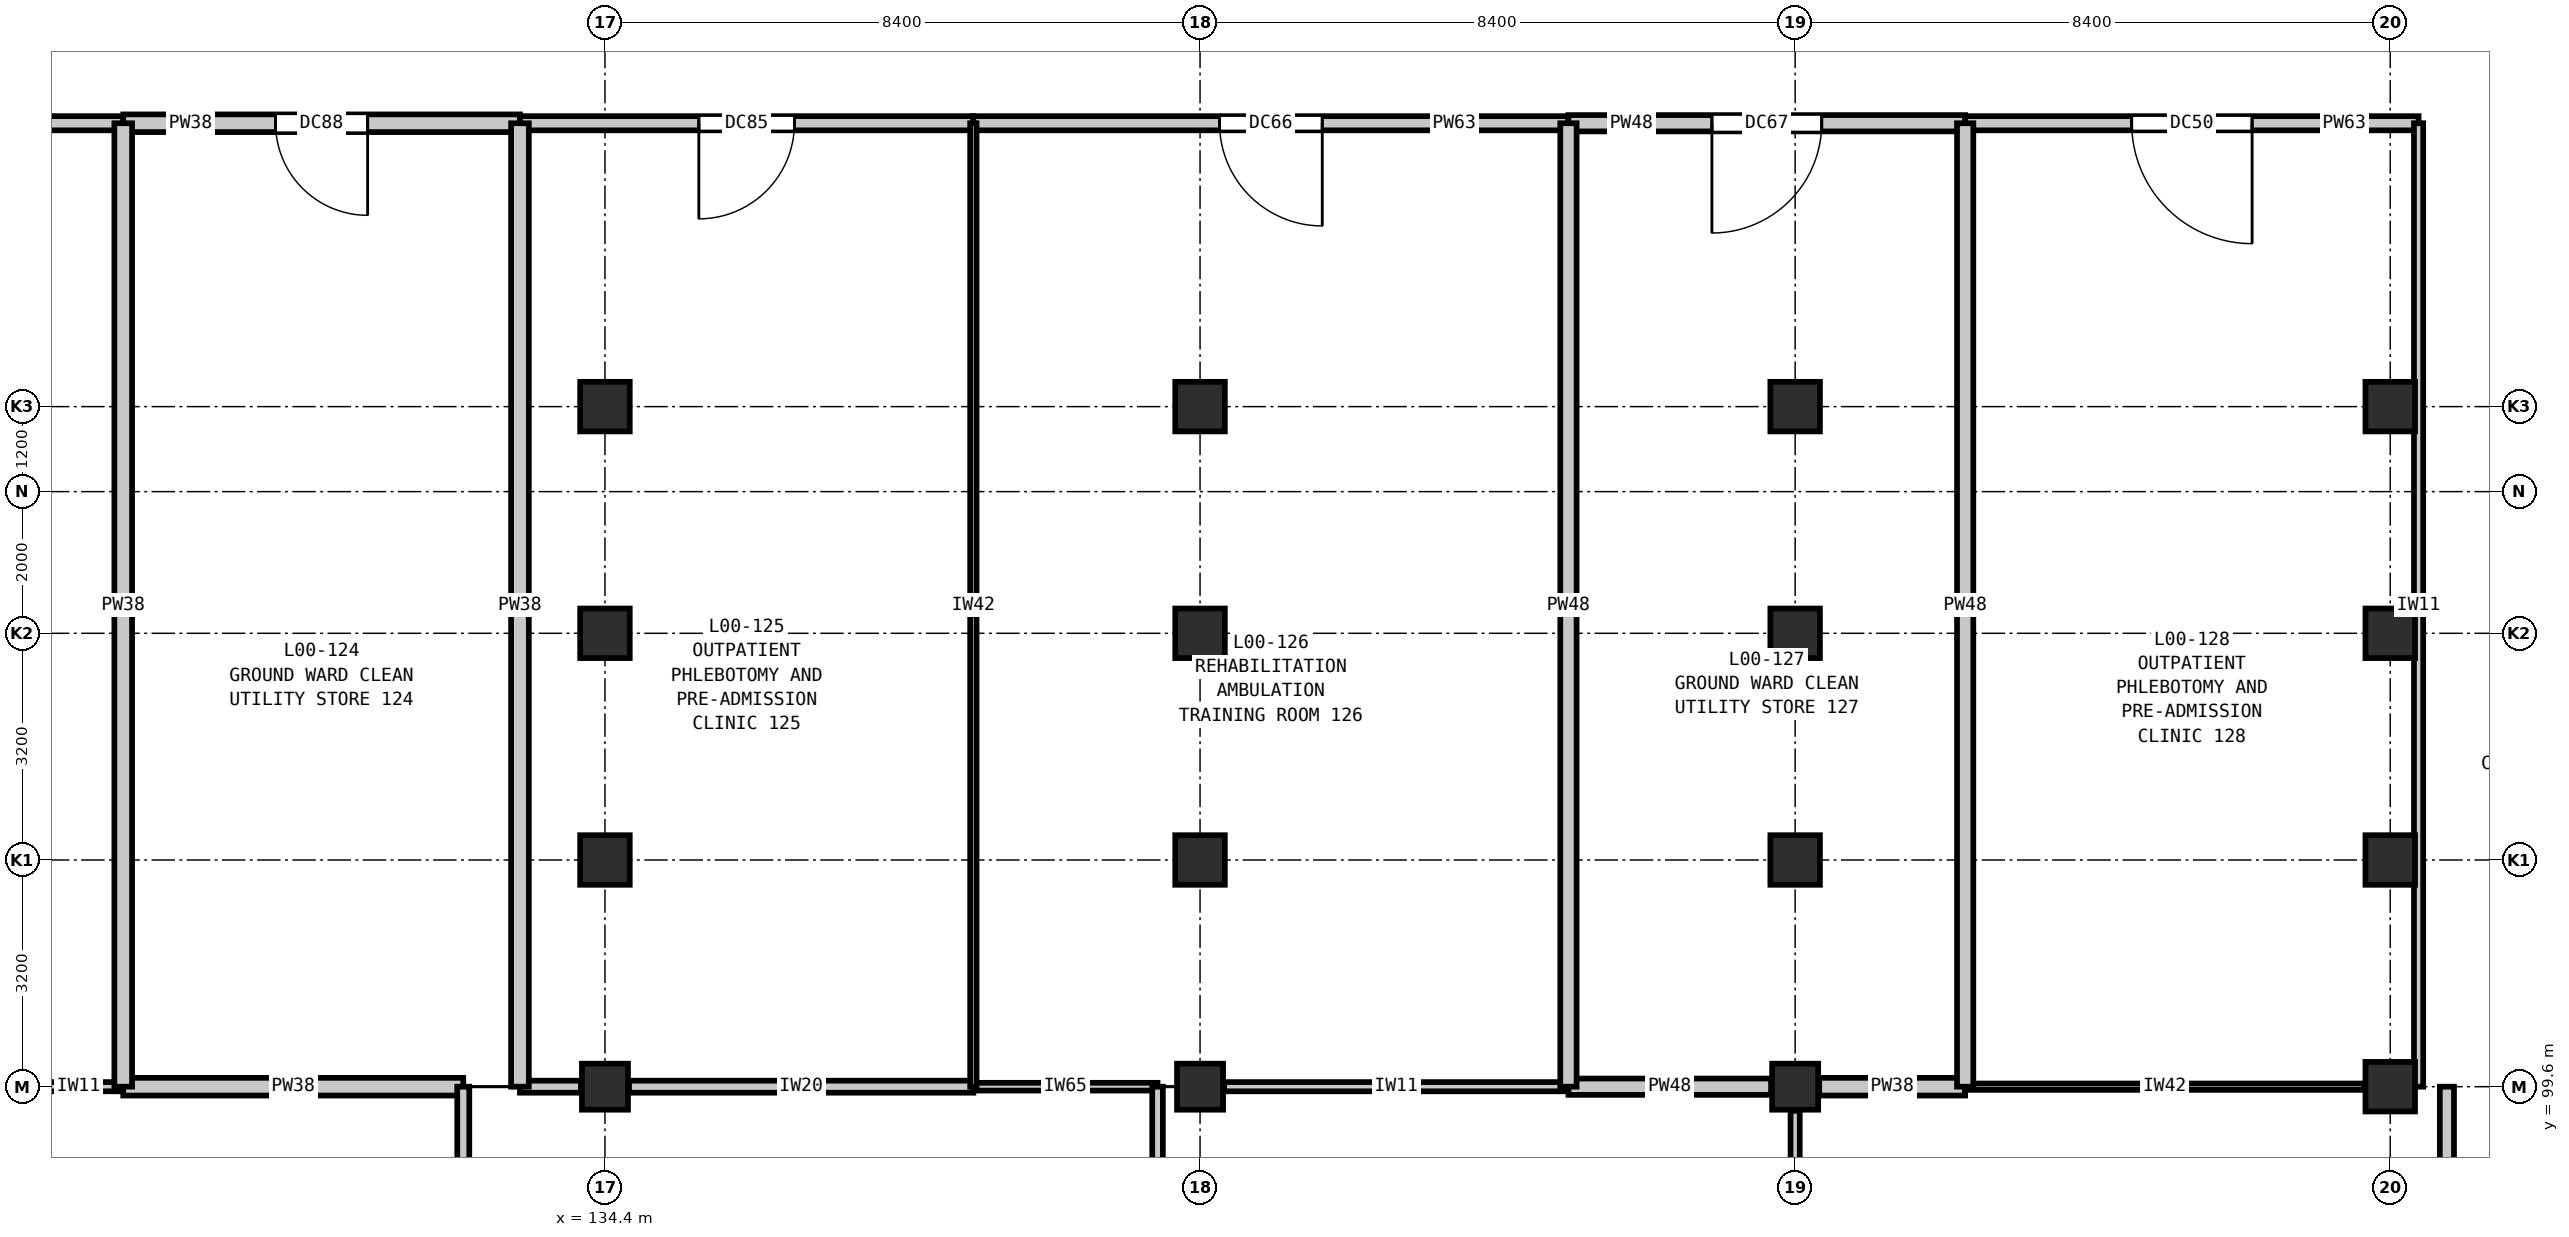
"""IFC4 building model, lengths in metres.
Left out: names, types, materials, properties, quantities, classifications, styles, units other than length and angle.
Written with IfcOpenShell. Run it as: python <this file> out.ifc"""

import sys

from ifc_helpers import new_model, si_unit, direction, frame, frame_2d, origin, origin_2d, place, context, subcontext, project, spatial, rectangle, extrude, element, fill, save


model = new_model("IFC4")
c1 = context("Model", 3, precision=1e-05, world=origin(), true_north=direction((0.0, 1.0)))
c2 = subcontext(c1, "Body", "Model", "MODEL_VIEW")
j1 = project(units=[si_unit("LENGTHUNIT", "METRE"), si_unit("PLANEANGLEUNIT", "RADIAN")], contexts=[c1])
p1 = place(None, origin())
s1 = spatial("IfcSite", under=j1, at=p1, CompositionType="ELEMENT")
p2 = place(p1, origin())
s2 = spatial("IfcBuilding", under=s1, at=p2, CompositionType="ELEMENT")
p3 = place(p2, origin())
s3 = spatial("IfcBuildingStorey", under=s2, at=p3, CompositionType="ELEMENT", Elevation=0.0)
p4 = place(p3, frame((134.4, 99.6, 0.0), z_axis=(0.0, 0.0, 1.0), x_axis=(1.0, 0.0, 0.0)))
e1 = element("IfcColumn", 1, at=p4, inside=s3, PredefinedType="COLUMN", context=c2, shape_type="SweptSolid", body=[
    extrude(rectangle(XDim=0.65, YDim=0.65, at=origin_2d()), origin(), (0.0, 0.0, 1.0), 5.4),
])
for number, where, z_axis, x_axis in (
    (2, (134.4, 102.8, 0.0), (0.0, 0.0, 1.0), (1.0, 0.0, 0.0)),
    (3, (134.4, 106.0, 0.0), (0.0, 0.0, 1.0), (1.0, 0.0, 0.0)),
    (4, (134.4, 109.2, 0.0), (0.0, 0.0, 1.0), (1.0, 0.0, 0.0)),
):
    element("IfcColumn", number, at=place(p3, frame(where, z_axis=z_axis, x_axis=x_axis)), inside=s3, PredefinedType="COLUMN", context=c2, shape_type="SweptSolid", body=[
        extrude(rectangle(XDim=0.7, YDim=0.7, at=origin_2d()), origin(), (0.0, 0.0, 1.0), 5.4),
    ])
p5 = place(p3, frame((142.8, 99.6, 0.0), z_axis=(0.0, 0.0, 1.0), x_axis=(1.0, 0.0, 0.0)))
e5 = element("IfcColumn", 5, at=p5, inside=s3, PredefinedType="COLUMN", context=c2, shape_type="SweptSolid", body=[
    extrude(rectangle(XDim=0.65, YDim=0.65, at=origin_2d()), origin(), (0.0, 0.0, 1.0), 5.4),
])
for number, where, z_axis, x_axis in (
    (6, (142.8, 102.8, 0.0), (0.0, 0.0, 1.0), (1.0, 0.0, 0.0)),
    (7, (142.8, 106.0, 0.0), (0.0, 0.0, 1.0), (1.0, 0.0, 0.0)),
    (8, (142.8, 109.2, 0.0), (0.0, 0.0, 1.0), (1.0, 0.0, 0.0)),
):
    element("IfcColumn", number, at=place(p3, frame(where, z_axis=z_axis, x_axis=x_axis)), inside=s3, PredefinedType="COLUMN", context=c2, shape_type="SweptSolid", body=[
        extrude(rectangle(XDim=0.7, YDim=0.7, at=origin_2d()), origin(), (0.0, 0.0, 1.0), 5.4),
    ])
p6 = place(p3, frame((151.2, 99.6, 0.0), z_axis=(0.0, 0.0, 1.0), x_axis=(1.0, 0.0, 0.0)))
e9 = element("IfcColumn", 9, at=p6, inside=s3, PredefinedType="COLUMN", context=c2, shape_type="SweptSolid", body=[
    extrude(rectangle(XDim=0.65, YDim=0.65, at=origin_2d()), origin(), (0.0, 0.0, 1.0), 5.4),
])
for number, where, z_axis, x_axis in (
    (10, (151.2, 102.8, 0.0), (0.0, 0.0, 1.0), (1.0, 0.0, 0.0)),
    (11, (151.2, 106.0, 0.0), (0.0, 0.0, 1.0), (1.0, 0.0, 0.0)),
    (12, (151.2, 109.2, 0.0), (0.0, 0.0, 1.0), (1.0, 0.0, 0.0)),
    (13, (159.6, 99.6, 0.0), (0.0, 0.0, 1.0), (1.0, 0.0, 0.0)),
    (14, (159.6, 102.8, 0.0), (0.0, 0.0, 1.0), (1.0, 0.0, 0.0)),
    (15, (159.6, 106.0, 0.0), (0.0, 0.0, 1.0), (1.0, 0.0, 0.0)),
    (16, (159.6, 109.2, 0.0), (0.0, 0.0, 1.0), (1.0, 0.0, 0.0)),
):
    element("IfcColumn", number, at=place(p3, frame(where, z_axis=z_axis, x_axis=x_axis)), inside=s3, PredefinedType="COLUMN", context=c2, shape_type="SweptSolid", body=[
        extrude(rectangle(XDim=0.7, YDim=0.7, at=origin_2d()), origin(), (0.0, 0.0, 1.0), 5.4),
    ])
p7 = place(p3, frame((126.34, 99.6, 0.0), z_axis=(0.0, 0.0, 1.0), x_axis=(1.0, 0.0, 0.0)))
e17 = element("IfcWall", 17, at=p7, inside=s3, PredefinedType="PARTITIONING", context=c2, shape_type="SweptSolid", body=[
    extrude(rectangle(XDim=1.26, YDim=0.13, at=frame_2d((0.63, 0.0))), origin(), (0.0, 0.0, 1.0), 4.635),
])
p8 = place(p3, frame((127.6, 99.6, 0.0), z_axis=(0.0, 0.0, 1.0), x_axis=(1.0, 0.0, 0.0)))
e18 = element("IfcWall", 18, at=p8, inside=s3, PredefinedType="PARTITIONING", context=c2, shape_type="SweptSolid", body=[
    extrude(rectangle(XDim=4.8, YDim=0.25, at=frame_2d((2.4, 0.0))), origin(), (0.0, 0.0, 1.0), 4.635),
])
p9 = place(p3, frame((134.74, 99.6, 0.0), z_axis=(0.0, 0.0, 1.0), x_axis=(1.0, 0.0, 0.0)))
e19 = element("IfcWall", 19, at=p9, inside=s3, PredefinedType="PARTITIONING", context=c2, shape_type="SweptSolid", body=[
    extrude(rectangle(XDim=4.86, YDim=0.17, at=frame_2d((2.43, 0.0))), origin(), (0.0, 0.0, 1.0), 4.635),
])
p10 = place(p3, frame((133.2, 99.6, 0.0), z_axis=(0.0, 0.0, 1.0), x_axis=(1.0, 0.0, 0.0)))
e20 = element("IfcWall", 20, at=p10, inside=s3, PredefinedType="PARTITIONING", context=c2, shape_type="SweptSolid", body=[
    extrude(rectangle(XDim=0.86, YDim=0.17, at=frame_2d((0.43, 0.0))), origin(), (0.0, 0.0, 1.0), 4.635),
])
p11 = place(p3, frame((139.6, 99.6, 0.0), z_axis=(0.0, 0.0, 1.0), x_axis=(1.0, 0.0, 0.0)))
e21 = element("IfcWall", 21, at=p11, inside=s3, PredefinedType="PARTITIONING", context=c2, shape_type="SweptSolid", body=[
    extrude(rectangle(XDim=2.6, YDim=0.11, at=frame_2d((1.3, 0.0))), origin(), (0.0, 0.0, 1.0), 4.635),
])
p12 = place(p3, frame((143.14, 99.6, 0.0), z_axis=(0.0, 0.0, 1.0), x_axis=(1.0, 0.0, 0.0)))
e22 = element("IfcWall", 22, at=p12, inside=s3, PredefinedType="PARTITIONING", context=c2, shape_type="SweptSolid", body=[
    extrude(rectangle(XDim=4.86, YDim=0.13, at=frame_2d((2.43, 0.0))), origin(), (0.0, 0.0, 1.0), 4.635),
])
p13 = place(p3, frame((148.0, 99.6, 0.0), z_axis=(0.0, 0.0, 1.0), x_axis=(1.0, 0.0, 0.0)))
e23 = element("IfcWall", 23, at=p13, inside=s3, PredefinedType="PARTITIONING", context=c2, shape_type="SweptSolid", body=[
    extrude(rectangle(XDim=2.86, YDim=0.23, at=frame_2d((1.43, 0.0))), origin(), (0.0, 0.0, 1.0), 4.635),
])
p14 = place(p3, frame((151.54, 99.6, 0.0), z_axis=(0.0, 0.0, 1.0), x_axis=(1.0, 0.0, 0.0)))
e24 = element("IfcWall", 24, at=p14, inside=s3, PredefinedType="PARTITIONING", context=c2, shape_type="SweptSolid", body=[
    extrude(rectangle(XDim=2.06, YDim=0.25, at=frame_2d((1.03, 0.0))), origin(), (0.0, 0.0, 1.0), 4.635),
])
p15 = place(p3, frame((153.6, 99.6, 0.0), z_axis=(0.0, 0.0, 1.0), x_axis=(1.0, 0.0, 0.0)))
e25 = element("IfcWall", 25, at=p15, inside=s3, PredefinedType="PARTITIONING", context=c2, shape_type="SweptSolid", body=[
    extrude(rectangle(XDim=5.635, YDim=0.09, at=frame_2d((2.817, 0.0))), origin(), (0.0, 0.0, 1.0), 4.635),
])
p16 = place(p3, frame((119.2, 113.2, 0.0), z_axis=(0.0, 0.0, 1.0), x_axis=(1.0, 0.0, 0.0)))
e26 = element("IfcWall", 26, at=p16, inside=s3, PredefinedType="PARTITIONING", context=c2, shape_type="SweptSolid", body=[
    extrude(rectangle(XDim=8.4, YDim=0.2, at=frame_2d((4.2, 0.0))), origin(), (0.0, 0.0, 1.0), 5.04),
])
p17 = place(p16, frame((3.575, 0.0, 0.0)))
e27 = element("IfcOpeningElement", 27, at=p17, cuts=e26, PredefinedType="OPENING", context=c2, shape_type="SweptSolid", body=[
    extrude(rectangle(XDim=1.25, YDim=2.15, at=frame_2d((0.625, 1.075))), frame((0.0, 0.11, 0.0), z_axis=(0.0, -1.0, 0.0), x_axis=(1.0, 0.0, 0.0)), (0.0, 0.0, 1.0), 0.22),
])
p18 = place(p3, frame((127.6, 113.2, 0.0), z_axis=(0.0, 0.0, 1.0), x_axis=(1.0, 0.0, 0.0)))
e28 = element("IfcWall", 28, at=p18, inside=s3, PredefinedType="PARTITIONING", context=c2, shape_type="SweptSolid", body=[
    extrude(rectangle(XDim=5.6, YDim=0.25, at=frame_2d((2.8, 0.0))), origin(), (0.0, 0.0, 1.0), 5.04),
])
p19 = place(p18, frame((2.15, 0.0, 0.0)))
e29 = element("IfcOpeningElement", 29, at=p19, cuts=e28, PredefinedType="OPENING", context=c2, shape_type="SweptSolid", body=[
    extrude(rectangle(XDim=1.3, YDim=2.2, at=frame_2d((0.65, 1.1))), frame((0.0, 0.135, 0.0), z_axis=(0.0, -1.0, 0.0), x_axis=(1.0, 0.0, 0.0)), (0.0, 0.0, 1.0), 0.27),
])
p20 = place(p3, frame((133.2, 113.2, 0.0), z_axis=(0.0, 0.0, 1.0), x_axis=(1.0, 0.0, 0.0)))
e30 = element("IfcWall", 30, at=p20, inside=s3, PredefinedType="PARTITIONING", context=c2, shape_type="SweptSolid", body=[
    extrude(rectangle(XDim=6.4, YDim=0.2, at=frame_2d((3.2, 0.0))), origin(), (0.0, 0.0, 1.0), 5.04),
])
p21 = place(p20, frame((2.525, 0.0, 0.0)))
e31 = element("IfcOpeningElement", 31, at=p21, cuts=e30, PredefinedType="OPENING", context=c2, shape_type="SweptSolid", body=[
    extrude(rectangle(XDim=1.35, YDim=2.2, at=frame_2d((0.675, 1.1))), frame((0.0, 0.11, 0.0), z_axis=(0.0, -1.0, 0.0), x_axis=(1.0, 0.0, 0.0)), (0.0, 0.0, 1.0), 0.22),
])
p22 = place(p3, frame((139.6, 113.2, 0.0), z_axis=(0.0, 0.0, 1.0), x_axis=(1.0, 0.0, 0.0)))
e32 = element("IfcWall", 32, at=p22, inside=s3, PredefinedType="PARTITIONING", context=c2, shape_type="SweptSolid", body=[
    extrude(rectangle(XDim=8.4, YDim=0.2, at=frame_2d((4.2, 0.0))), origin(), (0.0, 0.0, 1.0), 5.04),
])
p23 = place(p22, frame((3.475, 0.0, 0.0)))
e33 = element("IfcOpeningElement", 33, at=p23, cuts=e32, PredefinedType="OPENING", context=c2, shape_type="SweptSolid", body=[
    extrude(rectangle(XDim=1.45, YDim=2.25, at=frame_2d((0.725, 1.125))), frame((0.0, 0.11, 0.0), z_axis=(0.0, -1.0, 0.0), x_axis=(1.0, 0.0, 0.0)), (0.0, 0.0, 1.0), 0.22),
])
p24 = place(p3, frame((148.0, 113.2, 0.0), z_axis=(0.0, 0.0, 1.0), x_axis=(1.0, 0.0, 0.0)))
e34 = element("IfcWall", 34, at=p24, inside=s3, PredefinedType="PARTITIONING", context=c2, shape_type="SweptSolid", body=[
    extrude(rectangle(XDim=5.6, YDim=0.23, at=frame_2d((2.8, 0.0))), origin(), (0.0, 0.0, 1.0), 5.04),
])
p25 = place(p24, frame((2.025, 0.0, 0.0)))
e35 = element("IfcOpeningElement", 35, at=p25, cuts=e34, PredefinedType="OPENING", context=c2, shape_type="SweptSolid", body=[
    extrude(rectangle(XDim=1.55, YDim=2.25, at=frame_2d((0.775, 1.125))), frame((0.0, 0.125, 0.0), z_axis=(0.0, -1.0, 0.0), x_axis=(1.0, 0.0, 0.0)), (0.0, 0.0, 1.0), 0.25),
])
p26 = place(p3, frame((153.6, 113.2, 0.0), z_axis=(0.0, 0.0, 1.0), x_axis=(1.0, 0.0, 0.0)))
e36 = element("IfcWall", 36, at=p26, inside=s3, PredefinedType="PARTITIONING", context=c2, shape_type="SweptSolid", body=[
    extrude(rectangle(XDim=6.4, YDim=0.2, at=frame_2d((3.2, 0.0))), origin(), (0.0, 0.0, 1.0), 5.04),
])
p27 = place(p26, frame((2.35, 0.0, 0.0)))
e37 = element("IfcOpeningElement", 37, at=p27, cuts=e36, PredefinedType="OPENING", context=c2, shape_type="SweptSolid", body=[
    extrude(rectangle(XDim=1.7, YDim=2.3, at=frame_2d((0.85, 1.15))), frame((0.0, 0.11, 0.0), z_axis=(0.0, -1.0, 0.0), x_axis=(1.0, 0.0, 0.0)), (0.0, 0.0, 1.0), 0.22),
])
p28 = place(p3, frame((127.6, 99.6, 0.0), z_axis=(0.0, 0.0, 1.0), x_axis=(0.0, 1.0, 0.0)))
e38 = element("IfcWall", 38, at=p28, inside=s3, PredefinedType="PARTITIONING", context=c2, shape_type="SweptSolid", body=[
    extrude(rectangle(XDim=13.6, YDim=0.25, at=frame_2d((6.8, 0.0))), origin(), (0.0, 0.0, 1.0), 5.04),
])
p29 = place(p3, frame((132.4, 88.6, 0.0), z_axis=(0.0, 0.0, 1.0), x_axis=(0.0, 1.0, 0.0)))
e39 = element("IfcWall", 39, at=p29, inside=s3, PredefinedType="PARTITIONING", context=c2, shape_type="SweptSolid", body=[
    extrude(rectangle(XDim=11.0, YDim=0.17, at=frame_2d((5.5, 0.0))), origin(), (0.0, 0.0, 1.0), 5.04),
])
p30 = place(p3, frame((133.2, 99.6, 0.0), z_axis=(0.0, 0.0, 1.0), x_axis=(0.0, 1.0, 0.0)))
e40 = element("IfcWall", 40, at=p30, inside=s3, PredefinedType="PARTITIONING", context=c2, shape_type="SweptSolid", body=[
    extrude(rectangle(XDim=13.6, YDim=0.25, at=frame_2d((6.8, 0.0))), origin(), (0.0, 0.0, 1.0), 5.04),
])
p31 = place(p3, frame((139.6, 99.6, 0.0), z_axis=(0.0, 0.0, 1.0), x_axis=(0.0, 1.0, 0.0)))
e41 = element("IfcWall", 41, at=p31, inside=s3, PredefinedType="PARTITIONING", context=c2, shape_type="SweptSolid", body=[
    extrude(rectangle(XDim=13.6, YDim=0.09, at=frame_2d((6.8, 0.0))), origin(), (0.0, 0.0, 1.0), 5.04),
])
p32 = place(p3, frame((142.2, 88.6, 0.0), z_axis=(0.0, 0.0, 1.0), x_axis=(0.0, 1.0, 0.0)))
e42 = element("IfcWall", 42, at=p32, inside=s3, PredefinedType="PARTITIONING", context=c2, shape_type="SweptSolid", body=[
    extrude(rectangle(XDim=11.0, YDim=0.15, at=frame_2d((5.5, 0.0))), origin(), (0.0, 0.0, 1.0), 5.04),
])
p33 = place(p3, frame((148.0, 99.6, 0.0), z_axis=(0.0, 0.0, 1.0), x_axis=(0.0, 1.0, 0.0)))
e43 = element("IfcWall", 43, at=p33, inside=s3, PredefinedType="PARTITIONING", context=c2, shape_type="SweptSolid", body=[
    extrude(rectangle(XDim=13.6, YDim=0.23, at=frame_2d((6.8, 0.0))), origin(), (0.0, 0.0, 1.0), 5.04),
])
p34 = place(p3, frame((151.2, 91.54, 0.0), z_axis=(0.0, 0.0, 1.0), x_axis=(0.0, 1.0, 0.0)))
e44 = element("IfcWall", 44, at=p34, inside=s3, PredefinedType="PARTITIONING", context=c2, shape_type="SweptSolid", body=[
    extrude(rectangle(XDim=7.72, YDim=0.13, at=frame_2d((3.86, 0.0))), origin(), (0.0, 0.0, 1.0), 4.685),
])
p35 = place(p3, frame((153.6, 99.6, 0.0), z_axis=(0.0, 0.0, 1.0), x_axis=(0.0, 1.0, 0.0)))
e45 = element("IfcWall", 45, at=p35, inside=s3, PredefinedType="PARTITIONING", context=c2, shape_type="SweptSolid", body=[
    extrude(rectangle(XDim=13.6, YDim=0.23, at=frame_2d((6.8, 0.0))), origin(), (0.0, 0.0, 1.0), 5.04),
])
p36 = place(p3, frame((160.0, 99.6, 0.0), z_axis=(0.0, 0.0, 1.0), x_axis=(0.0, 1.0, 0.0)))
e46 = element("IfcWall", 46, at=p36, inside=s3, PredefinedType="PARTITIONING", context=c2, shape_type="SweptSolid", body=[
    extrude(rectangle(XDim=13.6, YDim=0.13, at=frame_2d((6.8, 0.0))), origin(), (0.0, 0.0, 1.0), 5.04),
])
p37 = place(p3, frame((160.4, 89.2, 0.0), z_axis=(0.0, 0.0, 1.0), x_axis=(0.0, 1.0, 0.0)))
e47 = element("IfcWall", 47, at=p37, inside=s3, PredefinedType="PARTITIONING", context=c2, shape_type="SweptSolid", body=[
    extrude(rectangle(XDim=10.4, YDim=0.2, at=frame_2d((5.2, 0.0))), origin(), (0.0, 0.0, 1.0), 5.04),
])
p38 = place(p37, frame((4.475, 0.0, 0.0)))
e48 = element("IfcOpeningElement", 48, at=p38, cuts=e47, PredefinedType="OPENING", context=c2, shape_type="SweptSolid", body=[
    extrude(rectangle(XDim=1.45, YDim=2.25, at=frame_2d((0.725, 1.125))), frame((0.0, 0.11, 0.0), z_axis=(0.0, -1.0, 0.0), x_axis=(1.0, 0.0, 0.0)), (0.0, 0.0, 1.0), 0.22),
])
p39 = place(p19, frame((1.3, 0.0, 0.0), z_axis=(0.0, 0.0, 1.0), x_axis=(-1.0, 0.0, 0.0)))
e49 = element("IfcDoor", 49, at=p39, inside=s3, OperationType="SINGLE_SWING_LEFT", PredefinedType="DOOR", context=c2, shape_type="SweptSolid", body=[
    extrude(rectangle(XDim=1.3, YDim=2.2, at=frame_2d((0.65, 1.1))), frame((0.0, 0.025, 0.0), z_axis=(0.0, -1.0, 0.0), x_axis=(1.0, 0.0, 0.0)), (0.0, 0.0, 1.0), 0.05),
])
fill(e29, e49)
p40 = place(p21, frame((1.35, 0.0, 0.0), z_axis=(0.0, 0.0, 1.0), x_axis=(-1.0, 0.0, 0.0)))
e50 = element("IfcDoor", 50, at=p40, inside=s3, OperationType="SINGLE_SWING_RIGHT", PredefinedType="DOOR", context=c2, shape_type="SweptSolid", body=[
    extrude(rectangle(XDim=1.35, YDim=2.2, at=frame_2d((0.675, 1.1))), frame((0.0, 0.025, 0.0), z_axis=(0.0, -1.0, 0.0), x_axis=(1.0, 0.0, 0.0)), (0.0, 0.0, 1.0), 0.05),
])
fill(e31, e50)
p41 = place(p23, frame((1.45, 0.0, 0.0), z_axis=(0.0, 0.0, 1.0), x_axis=(-1.0, 0.0, 0.0)))
e51 = element("IfcDoor", 51, at=p41, inside=s3, OperationType="SINGLE_SWING_LEFT", PredefinedType="DOOR", context=c2, shape_type="SweptSolid", body=[
    extrude(rectangle(XDim=1.45, YDim=2.25, at=frame_2d((0.725, 1.125))), frame((0.0, 0.025, 0.0), z_axis=(0.0, -1.0, 0.0), x_axis=(1.0, 0.0, 0.0)), (0.0, 0.0, 1.0), 0.05),
])
fill(e33, e51)
p42 = place(p25, frame((1.55, 0.0, 0.0), z_axis=(0.0, 0.0, 1.0), x_axis=(-1.0, 0.0, 0.0)))
e52 = element("IfcDoor", 52, at=p42, inside=s3, OperationType="SINGLE_SWING_RIGHT", PredefinedType="DOOR", context=c2, shape_type="SweptSolid", body=[
    extrude(rectangle(XDim=1.55, YDim=2.25, at=frame_2d((0.775, 1.125))), frame((0.0, 0.025, 0.0), z_axis=(0.0, -1.0, 0.0), x_axis=(1.0, 0.0, 0.0)), (0.0, 0.0, 1.0), 0.05),
])
fill(e35, e52)
p43 = place(p27, frame((1.7, 0.0, 0.0), z_axis=(0.0, 0.0, 1.0), x_axis=(-1.0, 0.0, 0.0)))
e53 = element("IfcDoor", 53, at=p43, inside=s3, OperationType="SINGLE_SWING_LEFT", PredefinedType="DOOR", context=c2, shape_type="SweptSolid", body=[
    extrude(rectangle(XDim=1.7, YDim=2.3, at=frame_2d((0.85, 1.15))), frame((0.0, 0.025, 0.0), z_axis=(0.0, -1.0, 0.0), x_axis=(1.0, 0.0, 0.0)), (0.0, 0.0, 1.0), 0.05),
])
fill(e37, e53)
save(model, sys.argv[1])
